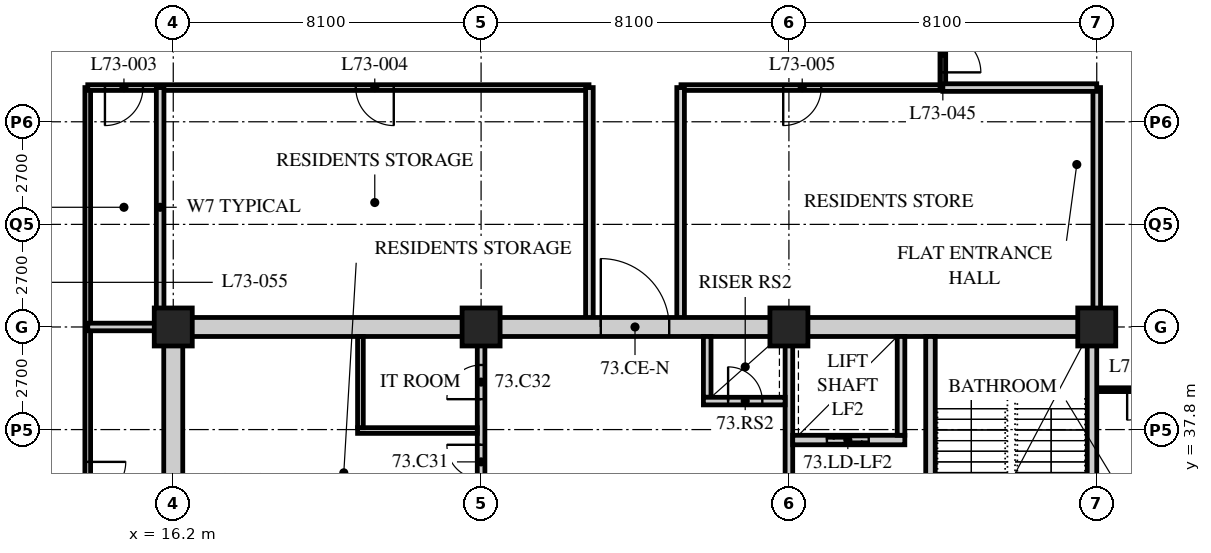
"""IFC4 building model, lengths in metres.
Left out: names, types, materials, properties, quantities, classifications, styles, units other than length and angle.
Written with IfcOpenShell. Run it as: python <this file> out.ifc"""

import sys

from ifc_helpers import new_model, si_unit, direction, frame, frame_2d, origin, origin_2d, place, context, subcontext, project, spatial, rectangle, hollow_rectangle, extrude, element, fill, save


model = new_model("IFC4")
c1 = context("Model", 3, precision=1e-05, world=origin(), true_north=direction((0.0, 1.0)))
c2 = subcontext(c1, "Body", "Model", "MODEL_VIEW")
j1 = project(units=[si_unit("LENGTHUNIT", "METRE"), si_unit("PLANEANGLEUNIT", "RADIAN")], contexts=[c1])
p1 = place(None, origin())
s1 = spatial("IfcSite", under=j1, at=p1, CompositionType="ELEMENT")
p2 = place(p1, origin())
s2 = spatial("IfcBuilding", under=s1, at=p2, CompositionType="ELEMENT")
p3 = place(p2, frame((0.0, 0.0, 285.3)))
s3 = spatial("IfcBuildingStorey", under=s2, at=p3, CompositionType="ELEMENT", Elevation=285.3)
for number, where, z_axis, x_axis in (
    (1, (16.2, 40.5, 0.0), (0.0, 0.0, 1.0), (1.0, 0.0, 0.0)),
    (2, (24.3, 40.5, 0.0), (0.0, 0.0, 1.0), (1.0, 0.0, 0.0)),
    (3, (32.4, 40.5, 0.0), (0.0, 0.0, 1.0), (1.0, 0.0, 0.0)),
    (4, (40.5, 40.5, 0.0), (0.0, 0.0, 1.0), (1.0, 0.0, 0.0)),
):
    element("IfcColumn", number, at=place(p3, frame(where, z_axis=z_axis, x_axis=x_axis)), inside=s3, PredefinedType="COLUMN", context=c2, shape_type="SweptSolid", body=[
        extrude(hollow_rectangle(XDim=1.0, YDim=1.0, WallThickness=0.1, at=origin_2d()), origin(), (0.0, 0.0, 1.0), 3.9),
    ])
p4 = place(p3, frame((13.95, 24.3, 0.0), z_axis=(0.0, 0.0, 1.0), x_axis=(0.0, 1.0, 0.0)))
e5 = element("IfcWall", 5, at=p4, inside=s3, PredefinedType="PARTITIONING", context=c2, shape_type="SweptSolid", body=[
    extrude(rectangle(XDim=22.5, YDim=0.15, at=frame_2d((11.25, 0.0))), origin(), (0.0, 0.0, 1.0), 3.69),
])
p5 = place(p4, frame((3.55, 0.0, 0.0)))
e6 = element("IfcOpeningElement", 6, at=p5, cuts=e5, PredefinedType="OPENING", context=c2, shape_type="SweptSolid", body=[
    extrude(rectangle(XDim=1.0, YDim=2.1, at=frame_2d((0.5, 1.05))), frame((0.0, 0.085, 0.0), z_axis=(0.0, -1.0, 0.0), x_axis=(1.0, 0.0, 0.0)), (0.0, 0.0, 1.0), 0.17),
])
p6 = place(p4, frame((11.65, 0.0, 0.0)))
e7 = element("IfcOpeningElement", 7, at=p6, cuts=e5, PredefinedType="OPENING", context=c2, shape_type="SweptSolid", body=[
    extrude(rectangle(XDim=1.0, YDim=2.1, at=frame_2d((0.5, 1.05))), frame((0.0, 0.085, 0.0), z_axis=(0.0, -1.0, 0.0), x_axis=(1.0, 0.0, 0.0)), (0.0, 0.0, 1.0), 0.17),
])
p7 = place(p3, frame((13.95, 46.8, 0.0), z_axis=(0.0, 0.0, 1.0), x_axis=(1.0, 0.0, 0.0)))
e8 = element("IfcWall", 8, at=p7, inside=s3, PredefinedType="PARTITIONING", context=c2, shape_type="SweptSolid", body=[
    extrude(rectangle(XDim=13.19, YDim=0.15, at=frame_2d((6.595, 0.0))), origin(), (0.0, 0.0, 1.0), 3.69),
])
p8 = place(p7, frame((0.452, 0.0, 0.0)))
e9 = element("IfcOpeningElement", 9, at=p8, cuts=e8, PredefinedType="OPENING", context=c2, shape_type="SweptSolid", body=[
    extrude(rectangle(XDim=1.0, YDim=2.1, at=frame_2d((0.5, 1.05))), frame((0.0, 0.085, 0.0), z_axis=(0.0, -1.0, 0.0), x_axis=(1.0, 0.0, 0.0)), (0.0, 0.0, 1.0), 0.17),
])
p9 = place(p7, frame((7.052, 0.0, 0.0)))
e10 = element("IfcOpeningElement", 10, at=p9, cuts=e8, PredefinedType="OPENING", context=c2, shape_type="SweptSolid", body=[
    extrude(rectangle(XDim=1.0, YDim=2.1, at=frame_2d((0.5, 1.05))), frame((0.0, 0.085, 0.0), z_axis=(0.0, -1.0, 0.0), x_axis=(1.0, 0.0, 0.0)), (0.0, 0.0, 1.0), 0.17),
])
p10 = place(p3, frame((29.56, 46.8, 0.0), z_axis=(0.0, 0.0, 1.0), x_axis=(1.0, 0.0, 0.0)))
e11 = element("IfcWall", 11, at=p10, inside=s3, PredefinedType="PARTITIONING", context=c2, shape_type="SweptSolid", body=[
    extrude(rectangle(XDim=6.89, YDim=0.15, at=frame_2d((3.445, 0.0))), origin(), (0.0, 0.0, 1.0), 3.69),
])
p11 = place(p10, frame((2.69, 0.0, 0.0)))
e12 = element("IfcOpeningElement", 12, at=p11, cuts=e11, PredefinedType="OPENING", context=c2, shape_type="SweptSolid", body=[
    extrude(rectangle(XDim=1.0, YDim=2.1, at=frame_2d((0.5, 1.05))), frame((0.0, 0.085, 0.0), z_axis=(0.0, -1.0, 0.0), x_axis=(1.0, 0.0, 0.0)), (0.0, 0.0, 1.0), 0.17),
])
for number, where, z_axis, x_axis in (
    (13, (15.855, 46.8, 0.0), (0.0, 0.0, 1.0), (0.0, -1.0, 0.0)),
    (14, (27.15, 40.5, 0.0), (0.0, 0.0, 1.0), (0.0, 1.0, 0.0)),
    (15, (29.55, 40.5, 0.0), (0.0, 0.0, 1.0), (0.0, 1.0, 0.0)),
):
    element("IfcWall", number, at=place(p3, frame(where, z_axis=z_axis, x_axis=x_axis)), inside=s3, PredefinedType="SOLIDWALL", context=c2, shape_type="SweptSolid", body=[
        extrude(rectangle(XDim=6.3, YDim=0.2, at=frame_2d((3.15, 0.0))), origin(), (0.0, 0.0, 1.0), 3.69),
    ])
p12 = place(p3, frame((36.45, 46.8, 0.0), z_axis=(0.0, 0.0, 1.0), x_axis=(0.0, 1.0, 0.0)))
e16 = element("IfcWall", 16, at=p12, inside=s3, PredefinedType="PARTITIONING", context=c2, shape_type="SweptSolid", body=[
    extrude(rectangle(XDim=1.8, YDim=0.15, at=frame_2d((0.9, 0.0))), origin(), (0.0, 0.0, 1.0), 3.69),
])
p13 = place(p12, frame((0.4, 0.0, 0.0)))
e17 = element("IfcOpeningElement", 17, at=p13, cuts=e16, PredefinedType="OPENING", context=c2, shape_type="SweptSolid", body=[
    extrude(rectangle(XDim=1.0, YDim=2.1, at=frame_2d((0.5, 1.05))), frame((0.0, 0.085, 0.0), z_axis=(0.0, -1.0, 0.0), x_axis=(1.0, 0.0, 0.0)), (0.0, 0.0, 1.0), 0.17),
])
p14 = place(p3, frame((40.5, 40.5, 0.0), z_axis=(0.0, 0.0, 1.0), x_axis=(0.0, 1.0, 0.0)))
e18 = element("IfcWall", 18, at=p14, inside=s3, PredefinedType="SOLIDWALL", context=c2, shape_type="SweptSolid", body=[
    extrude(rectangle(XDim=6.3, YDim=0.2, at=frame_2d((3.15, 0.0))), origin(), (0.0, 0.0, 1.0), 3.078),
])
p15 = place(p3, frame((13.95, 40.5, 0.0), z_axis=(0.0, 0.0, 1.0), x_axis=(1.0, 0.0, 0.0)))
e19 = element("IfcWall", 19, at=p15, inside=s3, PredefinedType="SOLIDWALL", context=c2, shape_type="SweptSolid", body=[
    extrude(rectangle(XDim=2.25, YDim=0.2, at=frame_2d((1.125, 0.0))), origin(), (0.0, 0.0, 1.0), 3.078),
])
p16 = place(p3, frame((40.5, 38.85, 0.0), z_axis=(0.0, 0.0, 1.0), x_axis=(1.0, 0.0, 0.0)))
e20 = element("IfcWall", 20, at=p16, inside=s3, PredefinedType="PARTITIONING", context=c2, shape_type="SweptSolid", body=[
    extrude(rectangle(XDim=2.4, YDim=0.1, at=frame_2d((1.2, 0.0))), origin(), (0.0, 0.0, 1.0), 3.69),
])
p17 = place(p16, frame((0.8, 0.0, 0.0)))
e21 = element("IfcOpeningElement", 21, at=p17, cuts=e20, PredefinedType="OPENING", context=c2, shape_type="SweptSolid", body=[
    extrude(rectangle(XDim=0.8, YDim=2.1, at=frame_2d((0.4, 1.05))), frame((0.0, 0.06, 0.0), z_axis=(0.0, -1.0, 0.0), x_axis=(1.0, 0.0, 0.0)), (0.0, 0.0, 1.0), 0.12),
])
p18 = place(p3, frame((36.45, 46.8, 0.0), z_axis=(0.0, 0.0, 1.0), x_axis=(1.0, 0.0, 0.0)))
e22 = element("IfcWall", 22, at=p18, inside=s3, PredefinedType="SOLIDWALL", context=c2, shape_type="SweptSolid", body=[
    extrude(rectangle(XDim=4.05, YDim=0.2, at=frame_2d((2.025, 0.0))), origin(), (0.0, 0.0, 1.0), 3.69),
])
p19 = place(p3, frame((15.95, 40.5, 0.0), z_axis=(0.0, 0.0, 1.0), x_axis=(1.0, 0.0, 0.0)))
e23 = element("IfcWall", 23, at=p19, inside=s3, PredefinedType="SOLIDWALL", context=c2, shape_type="SweptSolid", body=[
    extrude(rectangle(XDim=24.55, YDim=0.5, at=frame_2d((12.275, 0.0))), origin(), (0.0, 0.0, 1.0), 3.04),
])
p20 = place(p19, frame((11.5, 0.0, 0.0)))
e24 = element("IfcOpeningElement", 24, at=p20, cuts=e23, PredefinedType="OPENING", context=c2, shape_type="SweptSolid", body=[
    extrude(rectangle(XDim=1.8, YDim=2.4, at=frame_2d((0.9, 1.2))), frame((0.0, 0.26, 0.0), z_axis=(0.0, -1.0, 0.0), x_axis=(1.0, 0.0, 0.0)), (0.0, 0.0, 1.0), 0.52),
])
p21 = place(p3, frame((16.2, 24.55, 0.0), z_axis=(0.0, 0.0, 1.0), x_axis=(0.0, 1.0, 0.0)))
e25 = element("IfcWall", 25, at=p21, inside=s3, PredefinedType="SOLIDWALL", context=c2, shape_type="SweptSolid", body=[
    extrude(rectangle(XDim=15.7, YDim=0.5, at=frame_2d((7.85, 0.0))), origin(), (0.0, 0.0, 1.0), 3.078),
])
p22 = place(p3, frame((40.375, 24.55, 0.0), z_axis=(0.0, 0.0, 1.0), x_axis=(0.0, 1.0, 0.0)))
e26 = element("IfcWall", 26, at=p22, inside=s3, PredefinedType="SOLIDWALL", context=c2, shape_type="SweptSolid", body=[
    extrude(rectangle(XDim=15.7, YDim=0.25, at=frame_2d((7.85, 0.0))), origin(), (0.0, 0.0, 1.0), 3.078),
])
p23 = place(p3, frame((32.4, 32.5, 0.0), z_axis=(0.0, 0.0, 1.0), x_axis=(0.0, 1.0, 0.0)))
e27 = element("IfcWall", 27, at=p23, inside=s3, PredefinedType="SOLIDWALL", context=c2, shape_type="SweptSolid", body=[
    extrude(rectangle(XDim=7.75, YDim=0.2, at=frame_2d((3.875, 0.0))), origin(), (0.0, 0.0, 1.0), 3.078),
])
p24 = place(p23, frame((1.9, 0.0, 0.0)))
e28 = element("IfcOpeningElement", 28, at=p24, cuts=e27, PredefinedType="OPENING", context=c2, shape_type="SweptSolid", body=[
    extrude(rectangle(XDim=1.2, YDim=2.1, at=frame_2d((0.6, 1.05))), frame((0.0, 0.11, 0.0), z_axis=(0.0, -1.0, 0.0), x_axis=(1.0, 0.0, 0.0)), (0.0, 0.0, 1.0), 0.22),
])
p25 = place(p3, frame((36.125, 32.5, 0.0), z_axis=(0.0, 0.0, 1.0), x_axis=(0.0, 1.0, 0.0)))
e29 = element("IfcWall", 29, at=p25, inside=s3, PredefinedType="SOLIDWALL", context=c2, shape_type="SweptSolid", body=[
    extrude(rectangle(XDim=7.75, YDim=0.25, at=frame_2d((3.875, 0.0))), origin(), (0.0, 0.0, 1.0), 3.69),
])
p26 = place(p25, frame((0.45, 0.0, 0.0)))
e30 = element("IfcOpeningElement", 30, at=p26, cuts=e29, PredefinedType="OPENING", context=c2, shape_type="SweptSolid", body=[
    extrude(rectangle(XDim=1.2, YDim=2.1, at=frame_2d((0.6, 1.05))), frame((0.0, 0.135, 0.0), z_axis=(0.0, -1.0, 0.0), x_axis=(1.0, 0.0, 0.0)), (0.0, 0.0, 1.0), 0.27),
])
p27 = place(p3, frame((32.5, 37.525, 0.0), z_axis=(0.0, 0.0, 1.0), x_axis=(1.0, 0.0, 0.0)))
e31 = element("IfcWall", 31, at=p27, inside=s3, PredefinedType="SOLIDWALL", context=c2, shape_type="SweptSolid", body=[
    extrude(rectangle(XDim=2.95, YDim=0.25, at=frame_2d((1.475, 0.0))), origin(), (0.0, 0.0, 1.0), 3.69),
])
p28 = place(p27, frame((0.9, 0.0, 0.0)))
e32 = element("IfcOpeningElement", 32, at=p28, cuts=e31, PredefinedType="OPENING", context=c2, shape_type="SweptSolid", body=[
    extrude(rectangle(XDim=1.1, YDim=2.4, at=frame_2d((0.55, 1.2))), frame((0.0, 0.135, 0.0), z_axis=(0.0, -1.0, 0.0), x_axis=(1.0, 0.0, 0.0)), (0.0, 0.0, 1.0), 0.27),
])
p29 = place(p3, frame((35.35, 37.65, 0.0), z_axis=(0.0, 0.0, 1.0), x_axis=(0.0, 1.0, 0.0)))
e33 = element("IfcWall", 33, at=p29, inside=s3, PredefinedType="SOLIDWALL", context=c2, shape_type="SweptSolid", body=[
    extrude(rectangle(XDim=2.6, YDim=0.2, at=frame_2d((1.3, 0.0))), origin(), (0.0, 0.0, 1.0), 3.69),
])
p30 = place(p3, frame((30.25, 38.65, 0.0), z_axis=(0.0, 0.0, 1.0), x_axis=(0.0, 1.0, 0.0)))
e34 = element("IfcWall", 34, at=p30, inside=s3, PredefinedType="SOLIDWALL", context=c2, shape_type="SweptSolid", body=[
    extrude(rectangle(XDim=1.6, YDim=0.2, at=frame_2d((0.8, 0.0))), origin(), (0.0, 0.0, 1.0), 3.69),
])
p31 = place(p3, frame((30.15, 38.55, 0.0), z_axis=(0.0, 0.0, 1.0), x_axis=(1.0, 0.0, 0.0)))
e35 = element("IfcWall", 35, at=p31, inside=s3, PredefinedType="SOLIDWALL", context=c2, shape_type="SweptSolid", body=[
    extrude(rectangle(XDim=2.15, YDim=0.2, at=frame_2d((1.075, 0.0))), origin(), (0.0, 0.0, 1.0), 3.69),
])
p32 = place(p31, frame((0.65, 0.0, 0.0)))
e36 = element("IfcOpeningElement", 36, at=p32, cuts=e35, PredefinedType="OPENING", context=c2, shape_type="SweptSolid", body=[
    extrude(rectangle(XDim=0.9, YDim=2.1, at=frame_2d((0.45, 1.05))), frame((0.0, 0.11, 0.0), z_axis=(0.0, -1.0, 0.0), x_axis=(1.0, 0.0, 0.0)), (0.0, 0.0, 1.0), 0.22),
])
p33 = place(p3, frame((24.3, 32.5, 0.0), z_axis=(0.0, 0.0, 1.0), x_axis=(0.0, 1.0, 0.0)))
e37 = element("IfcWall", 37, at=p33, inside=s3, PredefinedType="PARTITIONING", context=c2, shape_type="SweptSolid", body=[
    extrude(rectangle(XDim=7.75, YDim=0.2, at=frame_2d((3.875, 0.0))), origin(), (0.0, 0.0, 1.0), 3.078),
])
p34 = place(p33, frame((1.275, 0.0, 0.0)))
e38 = element("IfcOpeningElement", 38, at=p34, cuts=e37, PredefinedType="OPENING", context=c2, shape_type="SweptSolid", body=[
    extrude(rectangle(XDim=1.0, YDim=2.1, at=frame_2d((0.5, 1.05))), frame((0.0, 0.11, 0.0), z_axis=(0.0, -1.0, 0.0), x_axis=(1.0, 0.0, 0.0)), (0.0, 0.0, 1.0), 0.22),
])
p35 = place(p33, frame((4.0, 0.0, 0.0)))
e39 = element("IfcOpeningElement", 39, at=p35, cuts=e37, PredefinedType="OPENING", context=c2, shape_type="SweptSolid", body=[
    extrude(rectangle(XDim=0.9, YDim=2.1, at=frame_2d((0.45, 1.05))), frame((0.0, 0.11, 0.0), z_axis=(0.0, -1.0, 0.0), x_axis=(1.0, 0.0, 0.0)), (0.0, 0.0, 1.0), 0.22),
])
p36 = place(p33, frame((6.1, 0.0, 0.0)))
e40 = element("IfcOpeningElement", 40, at=p36, cuts=e37, PredefinedType="OPENING", context=c2, shape_type="SweptSolid", body=[
    extrude(rectangle(XDim=0.9, YDim=2.1, at=frame_2d((0.45, 1.05))), frame((0.0, 0.11, 0.0), z_axis=(0.0, -1.0, 0.0), x_axis=(1.0, 0.0, 0.0)), (0.0, 0.0, 1.0), 0.22),
])
p37 = place(p3, frame((21.05, 37.775, 0.0), z_axis=(0.0, 0.0, 1.0), x_axis=(1.0, 0.0, 0.0)))
e41 = element("IfcWall", 41, at=p37, inside=s3, PredefinedType="PARTITIONING", context=c2, shape_type="SweptSolid", body=[
    extrude(rectangle(XDim=3.15, YDim=0.15, at=frame_2d((1.575, 0.0))), origin(), (0.0, 0.0, 1.0), 3.69),
])
p38 = place(p3, frame((21.125, 37.85, 0.0), z_axis=(0.0, 0.0, 1.0), x_axis=(0.0, 1.0, 0.0)))
e42 = element("IfcWall", 42, at=p38, inside=s3, PredefinedType="PARTITIONING", context=c2, shape_type="SweptSolid", body=[
    extrude(rectangle(XDim=2.4, YDim=0.15, at=frame_2d((1.2, 0.0))), origin(), (0.0, 0.0, 1.0), 3.69),
])
p39 = place(p6, origin())
e43 = element("IfcDoor", 43, at=p39, inside=s3, OperationType="SINGLE_SWING_LEFT", PredefinedType="DOOR", context=c2, shape_type="SweptSolid", body=[
    extrude(rectangle(XDim=1.0, YDim=2.1, at=frame_2d((0.5, 1.05))), frame((0.0, 0.025, 0.0), z_axis=(0.0, -1.0, 0.0), x_axis=(1.0, 0.0, 0.0)), (0.0, 0.0, 1.0), 0.05),
])
fill(e7, e43)
p40 = place(p8, origin())
e44 = element("IfcDoor", 44, at=p40, inside=s3, OperationType="SINGLE_SWING_RIGHT", PredefinedType="DOOR", context=c2, shape_type="SweptSolid", body=[
    extrude(rectangle(XDim=1.0, YDim=2.1, at=frame_2d((0.5, 1.05))), frame((0.0, 0.025, 0.0), z_axis=(0.0, -1.0, 0.0), x_axis=(1.0, 0.0, 0.0)), (0.0, 0.0, 1.0), 0.05),
])
fill(e9, e44)
p41 = place(p9, origin())
e45 = element("IfcDoor", 45, at=p41, inside=s3, OperationType="SINGLE_SWING_LEFT", PredefinedType="DOOR", context=c2, shape_type="SweptSolid", body=[
    extrude(rectangle(XDim=1.0, YDim=2.1, at=frame_2d((0.5, 1.05))), frame((0.0, 0.025, 0.0), z_axis=(0.0, -1.0, 0.0), x_axis=(1.0, 0.0, 0.0)), (0.0, 0.0, 1.0), 0.05),
])
fill(e10, e45)
p42 = place(p11, origin())
e46 = element("IfcDoor", 46, at=p42, inside=s3, OperationType="SINGLE_SWING_RIGHT", PredefinedType="DOOR", context=c2, shape_type="SweptSolid", body=[
    extrude(rectangle(XDim=1.0, YDim=2.1, at=frame_2d((0.5, 1.05))), frame((0.0, 0.025, 0.0), z_axis=(0.0, -1.0, 0.0), x_axis=(1.0, 0.0, 0.0)), (0.0, 0.0, 1.0), 0.05),
])
fill(e12, e46)
p43 = place(p13, origin())
e47 = element("IfcDoor", 47, at=p43, inside=s3, OperationType="SINGLE_SWING_RIGHT", PredefinedType="DOOR", context=c2, shape_type="SweptSolid", body=[
    extrude(rectangle(XDim=1.0, YDim=2.1, at=frame_2d((0.5, 1.05))), frame((0.0, 0.025, 0.0), z_axis=(0.0, -1.0, 0.0), x_axis=(1.0, 0.0, 0.0)), (0.0, 0.0, 1.0), 0.05),
])
fill(e17, e47)
p44 = place(p17, origin())
e48 = element("IfcDoor", 48, at=p44, inside=s3, OperationType="SINGLE_SWING_RIGHT", PredefinedType="DOOR", context=c2, shape_type="SweptSolid", body=[
    extrude(rectangle(XDim=0.8, YDim=2.1, at=frame_2d((0.4, 1.05))), frame((0.0, 0.025, 0.0), z_axis=(0.0, -1.0, 0.0), x_axis=(1.0, 0.0, 0.0)), (0.0, 0.0, 1.0), 0.05),
])
fill(e21, e48)
p45 = place(p35, origin())
e49 = element("IfcDoor", 49, at=p45, inside=s3, OperationType="SINGLE_SWING_RIGHT", PredefinedType="DOOR", context=c2, shape_type="SweptSolid", body=[
    extrude(rectangle(XDim=0.9, YDim=2.1, at=frame_2d((0.45, 1.05))), frame((0.0, 0.025, 0.0), z_axis=(0.0, -1.0, 0.0), x_axis=(1.0, 0.0, 0.0)), (0.0, 0.0, 1.0), 0.05),
])
fill(e39, e49)
p46 = place(p36, origin())
e50 = element("IfcDoor", 50, at=p46, inside=s3, OperationType="SINGLE_SWING_LEFT", PredefinedType="DOOR", context=c2, shape_type="SweptSolid", body=[
    extrude(rectangle(XDim=0.9, YDim=2.1, at=frame_2d((0.45, 1.05))), frame((0.0, 0.025, 0.0), z_axis=(0.0, -1.0, 0.0), x_axis=(1.0, 0.0, 0.0)), (0.0, 0.0, 1.0), 0.05),
])
fill(e40, e50)
p47 = place(p32, origin())
e51 = element("IfcDoor", 51, at=p47, inside=s3, OperationType="SINGLE_SWING_LEFT", PredefinedType="DOOR", context=c2, shape_type="SweptSolid", body=[
    extrude(rectangle(XDim=0.9, YDim=2.1, at=frame_2d((0.45, 1.05))), frame((0.0, 0.025, 0.0), z_axis=(0.0, -1.0, 0.0), x_axis=(1.0, 0.0, 0.0)), (0.0, 0.0, 1.0), 0.05),
])
fill(e36, e51)
p48 = place(p28, origin())
e52 = element("IfcDoor", 52, at=p48, inside=s3, OperationType="DOUBLE_DOOR_SLIDING", PredefinedType="DOOR", context=c2, shape_type="SweptSolid", body=[
    extrude(rectangle(XDim=1.1, YDim=2.4, at=frame_2d((0.55, 1.2))), frame((0.0, 0.025, 0.0), z_axis=(0.0, -1.0, 0.0), x_axis=(1.0, 0.0, 0.0)), (0.0, 0.0, 1.0), 0.05),
])
fill(e32, e52)
p49 = place(p20, origin())
e53 = element("IfcDoor", 53, at=p49, inside=s3, OperationType="DOUBLE_DOOR_SINGLE_SWING", PredefinedType="DOOR", context=c2, shape_type="SweptSolid", body=[
    extrude(rectangle(XDim=1.8, YDim=2.4, at=frame_2d((0.9, 1.2))), frame((0.0, 0.025, 0.0), z_axis=(0.0, -1.0, 0.0), x_axis=(1.0, 0.0, 0.0)), (0.0, 0.0, 1.0), 0.05),
])
fill(e24, e53)
save(model, sys.argv[1])
